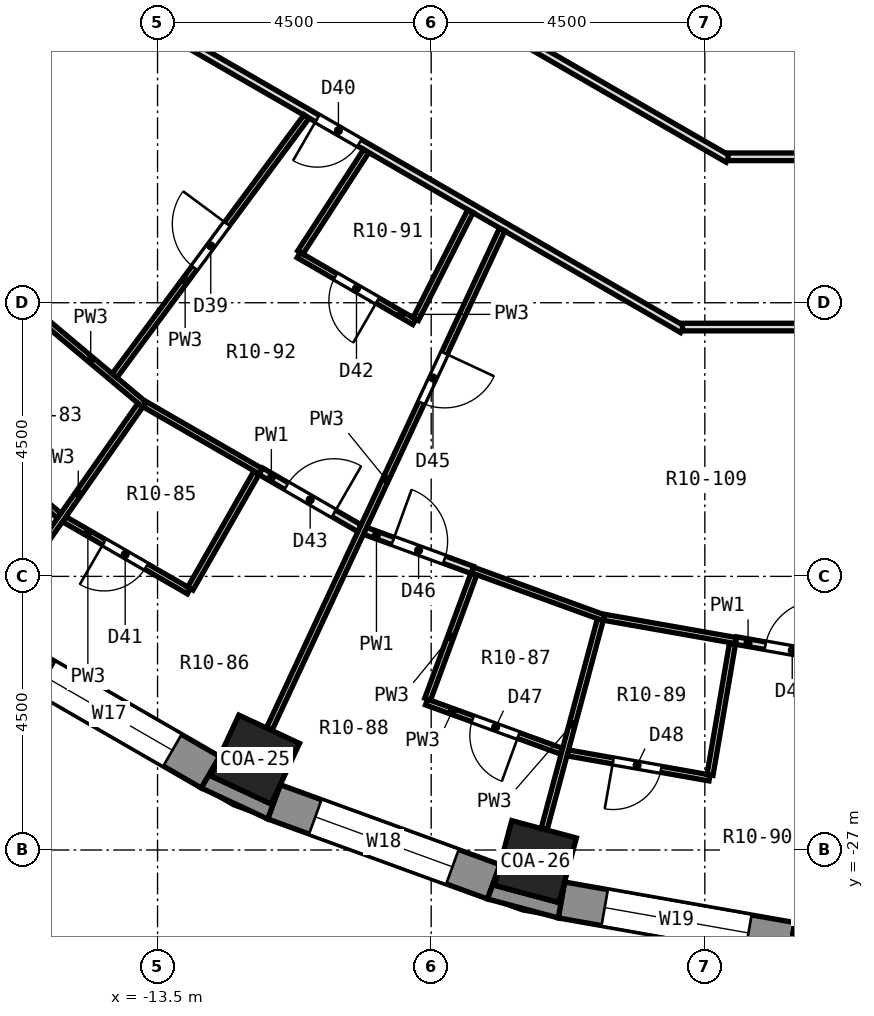
"""IFC4 building model, lengths in metres.
Left out: names, types, materials, properties, quantities, classifications, styles, units other than length and angle.
Written with IfcOpenShell. Run it as: python <this file> out.ifc"""

import sys

from ifc_helpers import new_model, si_unit, direction, frame, frame_2d, origin, origin_2d, place, context, subcontext, project, spatial, polyline, rectangle, outline, extrude, element, fill, save


model = new_model("IFC4")
c1 = context("Model", 3, precision=1e-05, world=origin(), true_north=direction((0.0, 1.0)))
c2 = subcontext(c1, "Body", "Model", "MODEL_VIEW")
j1 = project(units=[si_unit("LENGTHUNIT", "METRE"), si_unit("PLANEANGLEUNIT", "RADIAN")], contexts=[c1])
p1 = place(None, origin())
s1 = spatial("IfcSite", under=j1, at=p1, CompositionType="ELEMENT")
p2 = place(p1, origin())
s2 = spatial("IfcBuilding", under=s1, at=p2, CompositionType="ELEMENT")
p3 = place(p2, frame((0.0, 0.0, 36.2)))
s3 = spatial("IfcBuildingStorey", under=s2, at=p3, CompositionType="ELEMENT", Elevation=36.2)
for number, where, z_axis, x_axis in (
    (1, (-11.897, -25.512, 0.0), (0.0, 0.0, 1.0), (-0.423, -0.906, 0.0)),
    (2, (-7.286, -27.191, 0.0), (0.0, 0.0, 1.0), (-0.259, -0.966, 0.0)),
    (3, (-2.453, -28.043, 0.0), (0.0, 0.0, 1.0), (-0.087, -0.996, 0.0)),
):
    element("IfcColumn", number, at=place(p3, frame(where, z_axis=z_axis, x_axis=x_axis)), inside=s3, PredefinedType="COLUMN", context=c2, shape_type="SweptSolid", body=[
        extrude(rectangle(XDim=1.1, YDim=1.1, at=origin_2d()), origin(), (0.0, 0.0, 1.0), 3.3),
    ])
p4 = place(p3, frame((-15.96, -23.798, 0.0), z_axis=(0.0, 0.0, 1.0), x_axis=(0.86603124159, -0.499989888488, 0.0)))
e4 = element("IfcWall", 4, at=p4, inside=s3, PredefinedType="SOLIDWALL", context=c2, shape_type="SweptSolid", body=[
    extrude(rectangle(XDim=3.846, YDim=0.6, at=frame_2d((1.923, 0.0))), origin(), (0.0, 0.0, 1.0), 2.75),
])
p5 = place(p4, frame((0.723, 0.0, 0.9)))
e5 = element("IfcOpeningElement", 5, at=p5, cuts=e4, PredefinedType="OPENING", context=c2, shape_type="SweptSolid", body=[
    extrude(rectangle(XDim=2.4, YDim=1.8, at=frame_2d((1.2, 0.9))), frame((0.0, 0.312, 0.0), z_axis=(0.0, -1.0, 0.0), x_axis=(1.0, 0.0, 0.0)), (0.0, 0.0, 1.0), 0.624),
])
p6 = place(p3, frame((-11.585, -26.208, 0.0), z_axis=(0.0, 0.0, 1.0), x_axis=(0.939689588564, -0.342028474173, 0.0)))
e6 = element("IfcWall", 6, at=p6, inside=s3, PredefinedType="SOLIDWALL", context=c2, shape_type="SweptSolid", body=[
    extrude(rectangle(XDim=3.846, YDim=0.6, at=frame_2d((1.923, 0.0))), origin(), (0.0, 0.0, 1.0), 2.75),
])
p7 = place(p6, frame((0.723, 0.0, 0.9)))
e7 = element("IfcOpeningElement", 7, at=p7, cuts=e6, PredefinedType="OPENING", context=c2, shape_type="SweptSolid", body=[
    extrude(rectangle(XDim=2.4, YDim=1.8, at=frame_2d((1.2, 0.9))), frame((0.0, 0.312, 0.0), z_axis=(0.0, -1.0, 0.0), x_axis=(1.0, 0.0, 0.0)), (0.0, 0.0, 1.0), 0.624),
])
p8 = place(p3, frame((-6.858, -27.821, 0.0), z_axis=(0.0, 0.0, 1.0), x_axis=(0.984800809218, -0.173687553279, 0.0)))
e8 = element("IfcWall", 8, at=p8, inside=s3, PredefinedType="SOLIDWALL", context=c2, shape_type="SweptSolid", body=[
    extrude(rectangle(XDim=3.846, YDim=0.6, at=frame_2d((1.923, 0.0))), origin(), (0.0, 0.0, 1.0), 2.75),
])
p9 = place(p8, frame((0.723, 0.0, 0.9)))
e9 = element("IfcOpeningElement", 9, at=p9, cuts=e8, PredefinedType="OPENING", context=c2, shape_type="SweptSolid", body=[
    extrude(rectangle(XDim=2.4, YDim=1.8, at=frame_2d((1.2, 0.9))), frame((0.0, 0.312, 0.0), z_axis=(0.0, -1.0, 0.0), x_axis=(1.0, 0.0, 0.0)), (0.0, 0.0, 1.0), 0.624),
])
p10 = place(p3, origin())
e10 = element("IfcWall", 10, at=p10, inside=s3, PredefinedType="SOLIDWALL", context=c2, shape_type="SweptSolid", body=[
    extrude(outline(polyline([(-11.688, -26.49), (-11.483, -25.926), (-11.631, -26.243), (-12.628, -25.779), (-12.479, -25.461), (-12.78, -25.981), (-11.688, -26.49)])), origin(), (0.0, 0.0, 1.0), 2.75),
])
p11 = place(p3, origin())
e11 = element("IfcWall", 11, at=p11, inside=s3, PredefinedType="SOLIDWALL", context=c2, shape_type="SweptSolid", body=[
    extrude(outline(polyline([(-6.91, -28.117), (-6.806, -27.526), (-6.897, -27.865), (-7.959, -27.58), (-7.869, -27.241), (-8.074, -27.805), (-6.91, -28.117)])), origin(), (0.0, 0.0, 1.0), 2.75),
])
p12 = place(p3, origin())
e12 = element("IfcWall", 12, at=p12, inside=s3, PredefinedType="SOLIDWALL", context=c2, shape_type="SweptSolid", body=[
    extrude(outline(polyline([(-3.123, -28.785), (-1.923, -28.89), (-1.923, -28.29), (-1.954, -28.639), (-3.049, -28.543), (-3.019, -28.194), (-3.123, -28.785)])), origin(), (0.0, 0.0, 1.0), 2.75),
])
p13 = place(p3, frame((-16.931, -19.981, 0.0), z_axis=(0.0, 0.0, 1.0), x_axis=(0.766027746561, -0.642807507344, 0.0)))
e13 = element("IfcWall", 13, at=p13, inside=s3, PredefinedType="PARTITIONING", context=c2, shape_type="SweptSolid", body=[
    extrude(rectangle(XDim=2.368, YDim=0.1, at=frame_2d((1.184, 0.0))), origin(), (0.0, 0.0, 1.0), 2.75),
])
p14 = place(p13, frame((0.809, 0.0, 0.0)))
e14 = element("IfcOpeningElement", 14, at=p14, cuts=e13, PredefinedType="OPENING", context=c2, shape_type="SweptSolid", body=[
    extrude(rectangle(XDim=0.8, YDim=2.1, at=frame_2d((0.4, 1.05))), frame((0.0, 0.062, 0.0), z_axis=(0.0, -1.0, 0.0), x_axis=(1.0, 0.0, 0.0)), (0.0, 0.0, 1.0), 0.124),
])
p15 = place(p3, frame((-15.482, -18.194, 0.0), z_axis=(0.0, 0.0, 1.0), x_axis=(0.765838323525, -0.643033173499, 0.0)))
e15 = element("IfcWall", 15, at=p15, inside=s3, PredefinedType="PARTITIONING", context=c2, shape_type="SweptSolid", body=[
    extrude(rectangle(XDim=2.306, YDim=0.1, at=frame_2d((1.153, 0.0))), origin(), (0.0, 0.0, 1.0), 2.75),
])
p16 = place(p3, frame((-15.036, -21.56, 0.0), z_axis=(0.0, 0.0, 1.0), x_axis=(0.866032766724, -0.499987246797, 0.0)))
e16 = element("IfcWall", 16, at=p16, inside=s3, PredefinedType="PARTITIONING", context=c2, shape_type="SweptSolid", body=[
    extrude(rectangle(XDim=2.368, YDim=0.1, at=frame_2d((1.184, 0.0))), origin(), (0.0, 0.0, 1.0), 2.75),
])
p17 = place(p16, frame((0.759, 0.0, 0.0)))
e17 = element("IfcOpeningElement", 17, at=p17, cuts=e16, PredefinedType="OPENING", context=c2, shape_type="SweptSolid", body=[
    extrude(rectangle(XDim=0.8, YDim=2.1, at=frame_2d((0.4, 1.05))), frame((0.0, 0.062, 0.0), z_axis=(0.0, -1.0, 0.0), x_axis=(1.0, 0.0, 0.0)), (0.0, 0.0, 1.0), 0.124),
])
p18 = place(p3, frame((-13.712, -19.669, 0.0), z_axis=(0.0, 0.0, 1.0), x_axis=(0.865958826185, -0.500115298058, 0.0)))
e18 = element("IfcWall", 18, at=p18, inside=s3, PredefinedType="PARTITIONING", context=c2, shape_type="SweptSolid", body=[
    extrude(rectangle(XDim=2.206, YDim=0.1, at=frame_2d((1.103, 0.0))), origin(), (0.0, 0.0, 1.0), 2.75),
])
p19 = place(p3, frame((-11.802, -20.772, 0.0), z_axis=(0.0, 0.0, 1.0), x_axis=(0.866103179807, -0.499865263774, 0.0)))
e19 = element("IfcWall", 19, at=p19, inside=s3, PredefinedType="PARTITIONING", context=c2, shape_type="SweptSolid", body=[
    extrude(rectangle(XDim=1.875, YDim=0.125, at=frame_2d((0.937, 0.0))), origin(), (0.0, 0.0, 1.0), 2.75),
])
p20 = place(p19, frame((0.487, 0.0, 0.0)))
e20 = element("IfcOpeningElement", 20, at=p20, cuts=e19, PredefinedType="OPENING", context=c2, shape_type="SweptSolid", body=[
    extrude(rectangle(XDim=0.9, YDim=2.1, at=frame_2d((0.45, 1.05))), frame((0.0, 0.074, 0.0), z_axis=(0.0, -1.0, 0.0), x_axis=(1.0, 0.0, 0.0)), (0.0, 0.0, 1.0), 0.149),
])
p21 = place(p3, frame((-11.18, -17.216, 0.0), z_axis=(0.0, 0.0, 1.0), x_axis=(0.865970937006, -0.500094327363, 0.0)))
e21 = element("IfcWall", 21, at=p21, inside=s3, PredefinedType="PARTITIONING", context=c2, shape_type="SweptSolid", body=[
    extrude(rectangle(XDim=2.197, YDim=0.1, at=frame_2d((1.099, 0.0))), origin(), (0.0, 0.0, 1.0), 2.75),
])
p22 = place(p21, frame((0.699, 0.0, 0.0)))
e22 = element("IfcOpeningElement", 22, at=p22, cuts=e21, PredefinedType="OPENING", context=c2, shape_type="SweptSolid", body=[
    extrude(rectangle(XDim=0.8, YDim=2.1, at=frame_2d((0.4, 1.05))), frame((0.0, 0.062, 0.0), z_axis=(0.0, -1.0, 0.0), x_axis=(1.0, 0.0, 0.0)), (0.0, 0.0, 1.0), 0.124),
])
p23 = place(p3, frame((-13.416, -13.501, 0.0), z_axis=(0.0, 0.0, 1.0), x_axis=(0.86605048973, -0.49995654735, 0.0)))
e23 = element("IfcWall", 23, at=p23, inside=s3, PredefinedType="PARTITIONING", context=c2, shape_type="SweptSolid", body=[
    extrude(rectangle(XDim=9.871, YDim=0.125, at=frame_2d((4.935, 0.0))), origin(), (0.0, 0.0, 1.0), 2.75),
])
p24 = place(p23, frame((2.938, 0.0, 0.0)))
e24 = element("IfcOpeningElement", 24, at=p24, cuts=e23, PredefinedType="OPENING", context=c2, shape_type="SweptSolid", body=[
    extrude(rectangle(XDim=0.8, YDim=2.1, at=frame_2d((0.4, 1.05))), frame((0.0, 0.074, 0.0), z_axis=(0.0, -1.0, 0.0), x_axis=(1.0, 0.0, 0.0)), (0.0, 0.0, 1.0), 0.149),
])
p25 = place(p3, frame((-11.42, -11.42, 0.0), z_axis=(0.0, 0.0, 1.0), x_axis=(0.866026957163, -0.49999730946, 0.0)))
e25 = element("IfcWall", 25, at=p25, inside=s3, PredefinedType="PARTITIONING", context=c2, shape_type="SweptSolid", body=[
    extrude(rectangle(XDim=8.432, YDim=0.125, at=frame_2d((4.216, 0.0))), origin(), (0.0, 0.0, 1.0), 2.75),
])
p26 = place(p3, frame((-9.076, -24.567, 0.0), z_axis=(0.0, 0.0, 1.0), x_axis=(0.939654860842, -0.342123870106, 0.0)))
e26 = element("IfcWall", 26, at=p26, inside=s3, PredefinedType="PARTITIONING", context=c2, shape_type="SweptSolid", body=[
    extrude(rectangle(XDim=2.368, YDim=0.1, at=frame_2d((1.184, 0.0))), origin(), (0.0, 0.0, 1.0), 2.75),
])
p27 = place(p26, frame((0.809, 0.0, 0.0)))
e27 = element("IfcOpeningElement", 27, at=p27, cuts=e26, PredefinedType="OPENING", context=c2, shape_type="SweptSolid", body=[
    extrude(rectangle(XDim=0.8, YDim=2.1, at=frame_2d((0.4, 1.05))), frame((0.0, 0.062, 0.0), z_axis=(0.0, -1.0, 0.0), x_axis=(1.0, 0.0, 0.0)), (0.0, 0.0, 1.0), 0.124),
])
p28 = place(p3, frame((-8.326, -22.393, 0.0), z_axis=(0.0, 0.0, 1.0), x_axis=(0.939700645731, -0.341998094165, 0.0)))
e28 = element("IfcWall", 28, at=p28, inside=s3, PredefinedType="PARTITIONING", context=c2, shape_type="SweptSolid", body=[
    extrude(rectangle(XDim=2.306, YDim=0.1, at=frame_2d((1.153, 0.0))), origin(), (0.0, 0.0, 1.0), 2.75),
])
p29 = place(p3, frame((-10.088, -21.751, 0.0), z_axis=(0.0, 0.0, 1.0), x_axis=(0.939656514106, -0.342119329325, 0.0)))
e29 = element("IfcWall", 29, at=p29, inside=s3, PredefinedType="PARTITIONING", context=c2, shape_type="SweptSolid", body=[
    extrude(rectangle(XDim=1.875, YDim=0.125, at=frame_2d((0.938, 0.0))), origin(), (0.0, 0.0, 1.0), 2.75),
])
p30 = place(p29, frame((0.488, 0.0, 0.0)))
e30 = element("IfcOpeningElement", 30, at=p30, cuts=e29, PredefinedType="OPENING", context=c2, shape_type="SweptSolid", body=[
    extrude(rectangle(XDim=0.9, YDim=2.1, at=frame_2d((0.45, 1.05))), frame((0.0, 0.074, 0.0), z_axis=(0.0, -1.0, 0.0), x_axis=(1.0, 0.0, 0.0)), (0.0, 0.0, 1.0), 0.149),
])
p31 = place(p3, frame((-6.755, -25.403, 0.0), z_axis=(0.0, 0.0, 1.0), x_axis=(0.984788748944, -0.173755920625, 0.0)))
e31 = element("IfcWall", 31, at=p31, inside=s3, PredefinedType="PARTITIONING", context=c2, shape_type="SweptSolid", body=[
    extrude(rectangle(XDim=2.368, YDim=0.1, at=frame_2d((1.184, 0.0))), origin(), (0.0, 0.0, 1.0), 2.75),
])
p32 = place(p31, frame((0.759, 0.0, 0.0)))
e32 = element("IfcOpeningElement", 32, at=p32, cuts=e31, PredefinedType="OPENING", context=c2, shape_type="SweptSolid", body=[
    extrude(rectangle(XDim=0.8, YDim=2.1, at=frame_2d((0.4, 1.05))), frame((0.0, 0.062, 0.0), z_axis=(0.0, -1.0, 0.0), x_axis=(1.0, 0.0, 0.0)), (0.0, 0.0, 1.0), 0.124),
])
p33 = place(p3, frame((-6.158, -23.173, 0.0), z_axis=(0.0, 0.0, 1.0), x_axis=(0.984800270927, -0.173690605338, 0.0)))
e33 = element("IfcWall", 33, at=p33, inside=s3, PredefinedType="PARTITIONING", context=c2, shape_type="SweptSolid", body=[
    extrude(rectangle(XDim=2.205, YDim=0.1, at=frame_2d((1.103, 0.0))), origin(), (0.0, 0.0, 1.0), 2.75),
])
p34 = place(p3, frame((-3.986, -23.556, 0.0), z_axis=(0.0, 0.0, 1.0), x_axis=(0.984806134001, -0.173657359285, 0.0)))
e34 = element("IfcWall", 34, at=p34, inside=s3, PredefinedType="PARTITIONING", context=c2, shape_type="SweptSolid", body=[
    extrude(rectangle(XDim=1.85, YDim=0.125, at=frame_2d((0.925, 0.0))), origin(), (0.0, 0.0, 1.0), 2.75),
])
p35 = place(p34, frame((0.488, 0.0, 0.0)))
e35 = element("IfcOpeningElement", 35, at=p35, cuts=e34, PredefinedType="OPENING", context=c2, shape_type="SweptSolid", body=[
    extrude(rectangle(XDim=0.9, YDim=2.1, at=frame_2d((0.45, 1.05))), frame((0.0, 0.074, 0.0), z_axis=(0.0, -1.0, 0.0), x_axis=(1.0, 0.0, 0.0)), (0.0, 0.0, 1.0), 0.149),
])
p36 = place(p3, frame((-4.867, -18.4, 0.0), z_axis=(0.0, 0.0, 1.0), x_axis=(1.0, 0.0, 0.0)))
e36 = element("IfcWall", 36, at=p36, inside=s3, PredefinedType="PARTITIONING", context=c2, shape_type="SweptSolid", body=[
    extrude(rectangle(XDim=9.87, YDim=0.125, at=frame_2d((4.935, 0.0))), origin(), (0.0, 0.0, 1.0), 2.75),
])
p37 = place(p36, frame((6.028, 0.0, 0.0)))
e37 = element("IfcOpeningElement", 37, at=p37, cuts=e36, PredefinedType="OPENING", context=c2, shape_type="SweptSolid", body=[
    extrude(rectangle(XDim=1.0, YDim=2.1, at=frame_2d((0.5, 1.05))), frame((0.0, 0.074, 0.0), z_axis=(0.0, -1.0, 0.0), x_axis=(1.0, 0.0, 0.0)), (0.0, 0.0, 1.0), 0.149),
])
p38 = place(p3, frame((-4.117, -15.6, 0.0), z_axis=(0.0, 0.0, 1.0), x_axis=(1.0, 0.0, 0.0)))
e38 = element("IfcWall", 38, at=p38, inside=s3, PredefinedType="PARTITIONING", context=c2, shape_type="SweptSolid", body=[
    extrude(rectangle(XDim=8.37, YDim=0.125, at=frame_2d((4.185, 0.0))), origin(), (0.0, 0.0, 1.0), 2.75),
])
p39 = place(p3, frame((-14.207, -19.199, 0.0), z_axis=(0.0, 0.0, 1.0), x_axis=(0.595318943931, 0.80348948655, 0.0)))
e39 = element("IfcWall", 39, at=p39, inside=s3, PredefinedType="PARTITIONING", context=c2, shape_type="SweptSolid", body=[
    extrude(rectangle(XDim=5.302, YDim=0.1, at=frame_2d((2.651, 0.0))), origin(), (0.0, 0.0, 1.0), 2.75),
])
p40 = place(p39, frame((2.207, 0.0, 0.0)))
e40 = element("IfcOpeningElement", 40, at=p40, cuts=e39, PredefinedType="OPENING", context=c2, shape_type="SweptSolid", body=[
    extrude(rectangle(XDim=0.9, YDim=2.1, at=frame_2d((0.45, 1.05))), frame((0.0, 0.062, 0.0), z_axis=(0.0, -1.0, 0.0), x_axis=(1.0, 0.0, 0.0)), (0.0, 0.0, 1.0), 0.124),
])
p41 = place(p3, frame((-15.825, -22.6, 0.0), z_axis=(0.0, 0.0, 1.0), x_axis=(0.573536002802, 0.819180354678, 0.0)))
e41 = element("IfcWall", 41, at=p41, inside=s3, PredefinedType="PARTITIONING", context=c2, shape_type="SweptSolid", body=[
    extrude(rectangle(XDim=3.559, YDim=0.1, at=frame_2d((1.78, 0.0))), origin(), (0.0, 0.0, 1.0), 2.75),
])
p42 = place(p3, frame((-11.153, -17.174, 0.0), z_axis=(0.0, 0.0, 1.0), x_axis=(0.544664848093, 0.838653804172, 0.0)))
e42 = element("IfcWall", 42, at=p42, inside=s3, PredefinedType="PARTITIONING", context=c2, shape_type="SweptSolid", body=[
    extrude(rectangle(XDim=1.99, YDim=0.1, at=frame_2d((0.995, 0.0))), origin(), (0.0, 0.0, 1.0), 2.75),
])
p43 = place(p3, frame((-12.96, -22.701, 0.0), z_axis=(0.0, 0.0, 1.0), x_axis=(0.495742176046, 0.86846974322, 0.0)))
e43 = element("IfcWall", 43, at=p43, inside=s3, PredefinedType="PARTITIONING", context=c2, shape_type="SweptSolid", body=[
    extrude(rectangle(XDim=2.187, YDim=0.1, at=frame_2d((1.094, 0.0))), origin(), (0.0, 0.0, 1.0), 2.75),
])
p44 = place(p3, frame((-9.254, -18.271, 0.0), z_axis=(0.0, 0.0, 1.0), x_axis=(0.451770869898, 0.89213400401, 0.0)))
e44 = element("IfcWall", 44, at=p44, inside=s3, PredefinedType="PARTITIONING", context=c2, shape_type="SweptSolid", body=[
    extrude(rectangle(XDim=1.99, YDim=0.1, at=frame_2d((0.995, 0.0))), origin(), (0.0, 0.0, 1.0), 2.75),
])
p45 = place(p3, frame((-11.66, -25.005, 0.0), z_axis=(0.0, 0.0, 1.0), x_axis=(0.422646386434, 0.906294671745, 0.0)))
e45 = element("IfcWall", 45, at=p45, inside=s3, PredefinedType="PARTITIONING", context=c2, shape_type="SweptSolid", body=[
    extrude(rectangle(XDim=9.057, YDim=0.1, at=frame_2d((4.528, 0.0))), origin(), (0.0, 0.0, 1.0), 2.75),
])
p46 = place(p45, frame((5.914, 0.0, 0.0)))
e46 = element("IfcOpeningElement", 46, at=p46, cuts=e45, PredefinedType="OPENING", context=c2, shape_type="SweptSolid", body=[
    extrude(rectangle(XDim=0.9, YDim=2.1, at=frame_2d((0.45, 1.05))), frame((0.0, 0.062, 0.0), z_axis=(0.0, -1.0, 0.0), x_axis=(1.0, 0.0, 0.0)), (0.0, 0.0, 1.0), 0.124),
])
p47 = place(p3, frame((-9.059, -24.52, 0.0), z_axis=(0.0, 0.0, 1.0), x_axis=(0.346507080222, 0.93804735667, 0.0)))
e47 = element("IfcWall", 47, at=p47, inside=s3, PredefinedType="PARTITIONING", context=c2, shape_type="SweptSolid", body=[
    extrude(rectangle(XDim=2.187, YDim=0.1, at=frame_2d((1.094, 0.0))), origin(), (0.0, 0.0, 1.0), 2.75),
])
p48 = place(p3, frame((-7.141, -26.65, 0.0), z_axis=(0.0, 0.0, 1.0), x_axis=(0.259045837699, 0.965865028858, 0.0)))
e48 = element("IfcWall", 48, at=p48, inside=s3, PredefinedType="PARTITIONING", context=c2, shape_type="SweptSolid", body=[
    extrude(rectangle(XDim=3.559, YDim=0.1, at=frame_2d((1.779, 0.0))), origin(), (0.0, 0.0, 1.0), 2.75),
])
p49 = place(p3, frame((-4.415, -25.765, 0.0), z_axis=(0.0, 0.0, 1.0), x_axis=(0.168650911642, 0.985675844283, 0.0)))
e49 = element("IfcWall", 49, at=p49, inside=s3, PredefinedType="PARTITIONING", context=c2, shape_type="SweptSolid", body=[
    extrude(rectangle(XDim=2.187, YDim=0.1, at=frame_2d((1.094, 0.0))), origin(), (0.0, 0.0, 1.0), 2.75),
])
p50 = place(p5, origin())
e50 = element("IfcWindow", 50, at=p50, inside=s3, PartitioningType="SINGLE_PANEL", PredefinedType="WINDOW", context=c2, shape_type="SweptSolid", body=[
    extrude(rectangle(XDim=2.4, YDim=1.8, at=frame_2d((1.2, 0.9))), frame((0.0, 0.18, 0.0), z_axis=(0.0, -1.0, 0.0), x_axis=(1.0, 0.0, 0.0)), (0.0, 0.0, 1.0), 0.06),
])
fill(e5, e50)
p51 = place(p7, origin())
e51 = element("IfcWindow", 51, at=p51, inside=s3, PartitioningType="SINGLE_PANEL", PredefinedType="WINDOW", context=c2, shape_type="SweptSolid", body=[
    extrude(rectangle(XDim=2.4, YDim=1.8, at=frame_2d((1.2, 0.9))), frame((0.0, 0.18, 0.0), z_axis=(0.0, -1.0, 0.0), x_axis=(1.0, 0.0, 0.0)), (0.0, 0.0, 1.0), 0.06),
])
fill(e7, e51)
p52 = place(p9, origin())
e52 = element("IfcWindow", 52, at=p52, inside=s3, PartitioningType="SINGLE_PANEL", PredefinedType="WINDOW", context=c2, shape_type="SweptSolid", body=[
    extrude(rectangle(XDim=2.4, YDim=1.8, at=frame_2d((1.2, 0.9))), frame((0.0, 0.18, 0.0), z_axis=(0.0, -1.0, 0.0), x_axis=(1.0, 0.0, 0.0)), (0.0, 0.0, 1.0), 0.06),
])
fill(e9, e52)
p53 = place(p40, origin())
e53 = element("IfcDoor", 53, at=p53, inside=s3, OperationType="SINGLE_SWING_RIGHT", PredefinedType="DOOR", context=c2, shape_type="SweptSolid", body=[
    extrude(rectangle(XDim=0.9, YDim=2.1, at=frame_2d((0.45, 1.05))), frame((0.0, 0.025, 0.0), z_axis=(0.0, -1.0, 0.0), x_axis=(1.0, 0.0, 0.0)), (0.0, 0.0, 1.0), 0.05),
])
fill(e40, e53)
p54 = place(p24, frame((0.8, 0.0, 0.0), z_axis=(0.0, 0.0, 1.0), x_axis=(-1.0, 0.0, 0.0)))
e54 = element("IfcDoor", 54, at=p54, inside=s3, OperationType="SINGLE_SWING_RIGHT", PredefinedType="DOOR", context=c2, shape_type="SweptSolid", body=[
    extrude(rectangle(XDim=0.8, YDim=2.1, at=frame_2d((0.4, 1.05))), frame((0.0, 0.025, 0.0), z_axis=(0.0, -1.0, 0.0), x_axis=(1.0, 0.0, 0.0)), (0.0, 0.0, 1.0), 0.05),
])
fill(e24, e54)
p55 = place(p17, frame((0.8, 0.0, 0.0), z_axis=(0.0, 0.0, 1.0), x_axis=(-1.0, 0.0, 0.0)))
e55 = element("IfcDoor", 55, at=p55, inside=s3, OperationType="SINGLE_SWING_RIGHT", PredefinedType="DOOR", context=c2, shape_type="SweptSolid", body=[
    extrude(rectangle(XDim=0.8, YDim=2.1, at=frame_2d((0.4, 1.05))), frame((0.0, 0.025, 0.0), z_axis=(0.0, -1.0, 0.0), x_axis=(1.0, 0.0, 0.0)), (0.0, 0.0, 1.0), 0.05),
])
fill(e17, e55)
p56 = place(p22, frame((0.8, 0.0, 0.0), z_axis=(0.0, 0.0, 1.0), x_axis=(-1.0, 0.0, 0.0)))
e56 = element("IfcDoor", 56, at=p56, inside=s3, OperationType="SINGLE_SWING_LEFT", PredefinedType="DOOR", context=c2, shape_type="SweptSolid", body=[
    extrude(rectangle(XDim=0.8, YDim=2.1, at=frame_2d((0.4, 1.05))), frame((0.0, 0.025, 0.0), z_axis=(0.0, -1.0, 0.0), x_axis=(1.0, 0.0, 0.0)), (0.0, 0.0, 1.0), 0.05),
])
fill(e22, e56)
p57 = place(p20, origin())
e57 = element("IfcDoor", 57, at=p57, inside=s3, OperationType="SINGLE_SWING_RIGHT", PredefinedType="DOOR", context=c2, shape_type="SweptSolid", body=[
    extrude(rectangle(XDim=0.9, YDim=2.1, at=frame_2d((0.45, 1.05))), frame((0.0, 0.025, 0.0), z_axis=(0.0, -1.0, 0.0), x_axis=(1.0, 0.0, 0.0)), (0.0, 0.0, 1.0), 0.05),
])
fill(e20, e57)
p58 = place(p46, frame((0.9, 0.0, 0.0), z_axis=(0.0, 0.0, 1.0), x_axis=(-1.0, 0.0, 0.0)))
e58 = element("IfcDoor", 58, at=p58, inside=s3, OperationType="SINGLE_SWING_LEFT", PredefinedType="DOOR", context=c2, shape_type="SweptSolid", body=[
    extrude(rectangle(XDim=0.9, YDim=2.1, at=frame_2d((0.45, 1.05))), frame((0.0, 0.025, 0.0), z_axis=(0.0, -1.0, 0.0), x_axis=(1.0, 0.0, 0.0)), (0.0, 0.0, 1.0), 0.05),
])
fill(e46, e58)
p59 = place(p30, origin())
e59 = element("IfcDoor", 59, at=p59, inside=s3, OperationType="SINGLE_SWING_LEFT", PredefinedType="DOOR", context=c2, shape_type="SweptSolid", body=[
    extrude(rectangle(XDim=0.9, YDim=2.1, at=frame_2d((0.45, 1.05))), frame((0.0, 0.025, 0.0), z_axis=(0.0, -1.0, 0.0), x_axis=(1.0, 0.0, 0.0)), (0.0, 0.0, 1.0), 0.05),
])
fill(e30, e59)
p60 = place(p27, frame((0.8, 0.0, 0.0), z_axis=(0.0, 0.0, 1.0), x_axis=(-1.0, 0.0, 0.0)))
e60 = element("IfcDoor", 60, at=p60, inside=s3, OperationType="SINGLE_SWING_LEFT", PredefinedType="DOOR", context=c2, shape_type="SweptSolid", body=[
    extrude(rectangle(XDim=0.8, YDim=2.1, at=frame_2d((0.4, 1.05))), frame((0.0, 0.025, 0.0), z_axis=(0.0, -1.0, 0.0), x_axis=(1.0, 0.0, 0.0)), (0.0, 0.0, 1.0), 0.05),
])
fill(e27, e60)
p61 = place(p32, frame((0.8, 0.0, 0.0), z_axis=(0.0, 0.0, 1.0), x_axis=(-1.0, 0.0, 0.0)))
e61 = element("IfcDoor", 61, at=p61, inside=s3, OperationType="SINGLE_SWING_RIGHT", PredefinedType="DOOR", context=c2, shape_type="SweptSolid", body=[
    extrude(rectangle(XDim=0.8, YDim=2.1, at=frame_2d((0.4, 1.05))), frame((0.0, 0.025, 0.0), z_axis=(0.0, -1.0, 0.0), x_axis=(1.0, 0.0, 0.0)), (0.0, 0.0, 1.0), 0.05),
])
fill(e32, e61)
p62 = place(p35, origin())
e62 = element("IfcDoor", 62, at=p62, inside=s3, OperationType="SINGLE_SWING_RIGHT", PredefinedType="DOOR", context=c2, shape_type="SweptSolid", body=[
    extrude(rectangle(XDim=0.9, YDim=2.1, at=frame_2d((0.45, 1.05))), frame((0.0, 0.025, 0.0), z_axis=(0.0, -1.0, 0.0), x_axis=(1.0, 0.0, 0.0)), (0.0, 0.0, 1.0), 0.05),
])
fill(e35, e62)
save(model, sys.argv[1])
